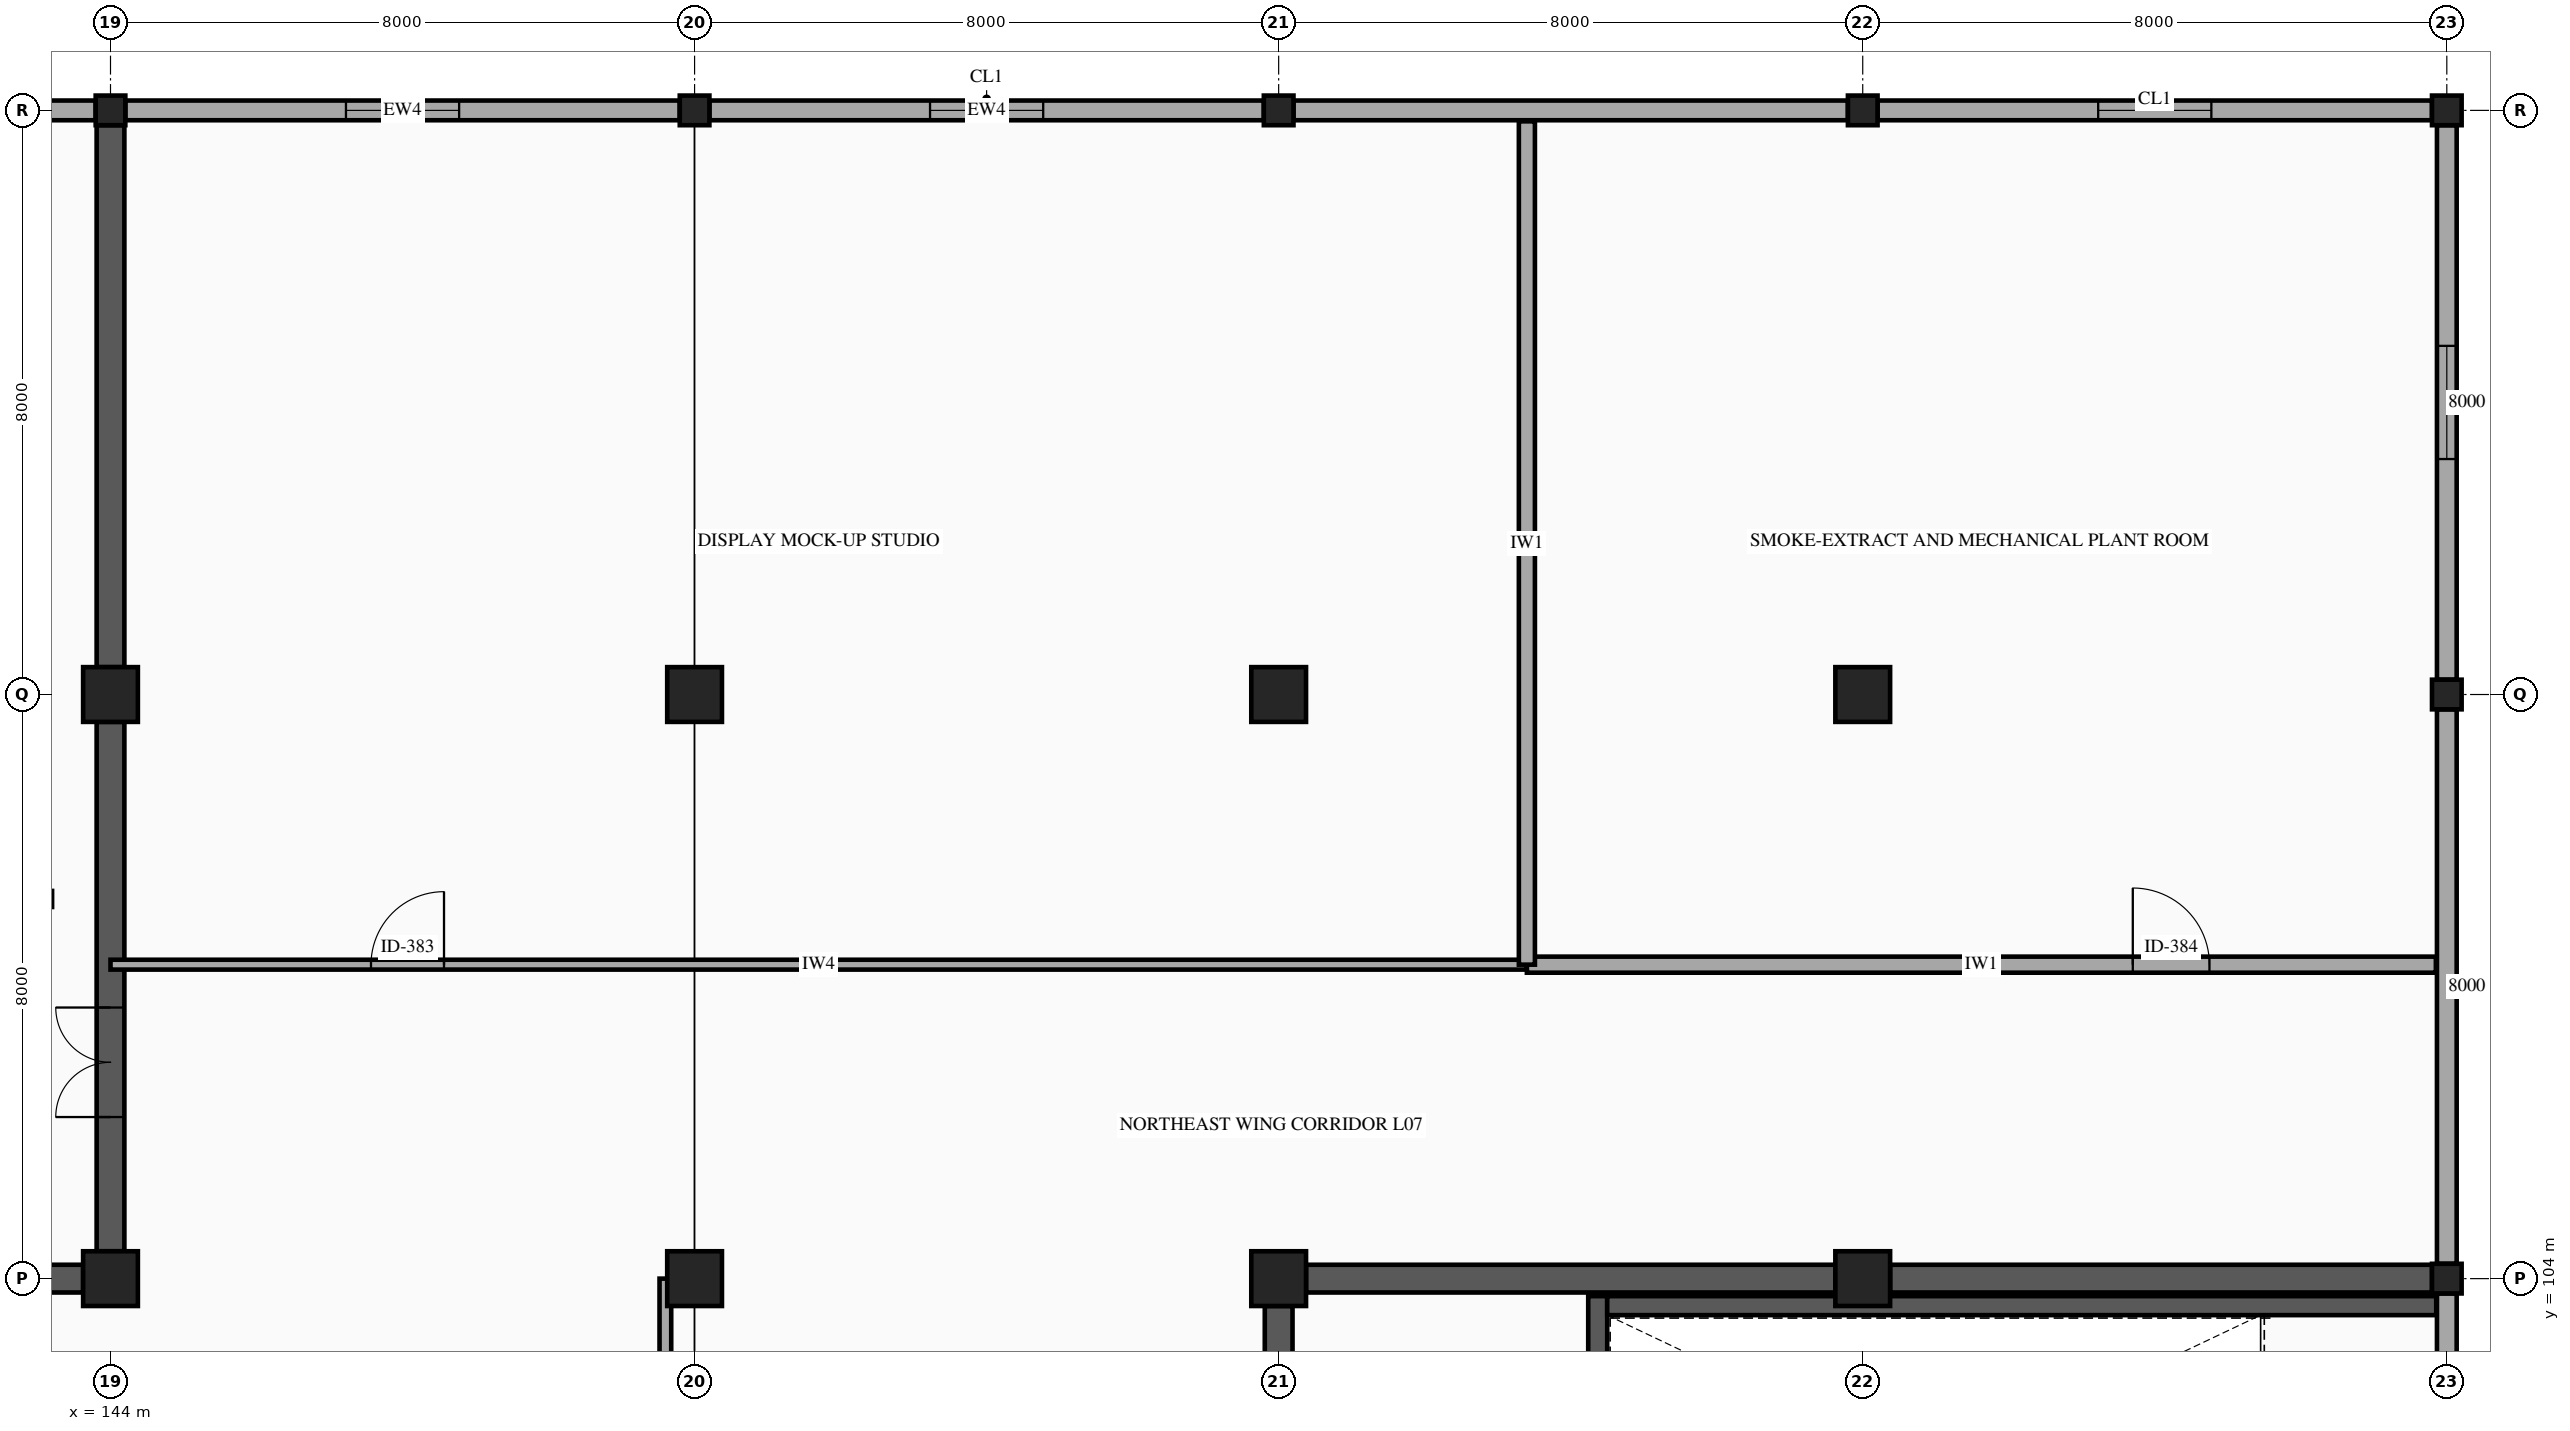
"""IFC4 building model, lengths in metres.
Left out: names, types, materials, properties, quantities, classifications, styles, units other than length and angle.
Written with IfcOpenShell. Run it as: python <this file> out.ifc"""

import sys

from ifc_helpers import new_model, si_unit, direction, frame, frame_2d, origin, origin_2d, place, context, subcontext, project, spatial, rectangle, hollow_rectangle, extrude, element, fill, save


model = new_model("IFC4")
c1 = context("Model", 3, precision=1e-05, world=origin(), true_north=direction((0.0, 1.0)))
c2 = subcontext(c1, "Body", "Model", "MODEL_VIEW")
j1 = project(units=[si_unit("LENGTHUNIT", "METRE"), si_unit("PLANEANGLEUNIT", "RADIAN")], contexts=[c1])
p1 = place(None, origin())
s1 = spatial("IfcSite", under=j1, at=p1, CompositionType="ELEMENT")
p2 = place(p1, origin())
s2 = spatial("IfcBuilding", under=s1, at=p2, CompositionType="ELEMENT")
p3 = place(p2, frame((0.0, 0.0, 32.9)))
s3 = spatial("IfcBuildingStorey", under=s2, at=p3, CompositionType="ELEMENT", Elevation=32.9)
for number, where, z_axis, x_axis in (
    (1, (144.0, 104.0, 0.0), (0.0, 0.0, 1.0), (1.0, 0.0, 0.0)),
    (2, (144.0, 112.0, 0.0), (0.0, 0.0, 1.0), (1.0, 0.0, 0.0)),
):
    element("IfcColumn", number, at=place(p3, frame(where, z_axis=z_axis, x_axis=x_axis)), inside=s3, PredefinedType="COLUMN", context=c2, shape_type="SweptSolid", body=[
        extrude(rectangle(XDim=0.75, YDim=0.75, at=origin_2d()), origin(), (0.0, 0.0, 1.0), 4.6),
    ])
p4 = place(p3, frame((144.0, 120.0, 0.0), z_axis=(0.0, 0.0, 1.0), x_axis=(1.0, 0.0, 0.0)))
e3 = element("IfcColumn", 3, at=p4, inside=s3, PredefinedType="COLUMN", context=c2, shape_type="SweptSolid", body=[
    extrude(hollow_rectangle(XDim=0.406, YDim=0.406, WallThickness=0.015, InnerFilletRadius=0.015, OuterFilletRadius=0.029, at=origin_2d()), origin(), (0.0, 0.0, 1.0), 4.6),
])
for number, where, z_axis, x_axis in (
    (4, (152.0, 104.0, 0.0), (0.0, 0.0, 1.0), (1.0, 0.0, 0.0)),
    (5, (152.0, 112.0, 0.0), (0.0, 0.0, 1.0), (1.0, 0.0, 0.0)),
):
    element("IfcColumn", number, at=place(p3, frame(where, z_axis=z_axis, x_axis=x_axis)), inside=s3, PredefinedType="COLUMN", context=c2, shape_type="SweptSolid", body=[
        extrude(rectangle(XDim=0.75, YDim=0.75, at=origin_2d()), origin(), (0.0, 0.0, 1.0), 4.6),
    ])
p5 = place(p3, frame((152.0, 120.0, 0.0), z_axis=(0.0, 0.0, 1.0), x_axis=(1.0, 0.0, 0.0)))
e6 = element("IfcColumn", 6, at=p5, inside=s3, PredefinedType="COLUMN", context=c2, shape_type="SweptSolid", body=[
    extrude(hollow_rectangle(XDim=0.406, YDim=0.406, WallThickness=0.015, InnerFilletRadius=0.015, OuterFilletRadius=0.029, at=origin_2d()), origin(), (0.0, 0.0, 1.0), 4.6),
])
for number, where, z_axis, x_axis in (
    (7, (160.0, 104.0, 0.0), (0.0, 0.0, 1.0), (1.0, 0.0, 0.0)),
    (8, (160.0, 112.0, 0.0), (0.0, 0.0, 1.0), (1.0, 0.0, 0.0)),
):
    element("IfcColumn", number, at=place(p3, frame(where, z_axis=z_axis, x_axis=x_axis)), inside=s3, PredefinedType="COLUMN", context=c2, shape_type="SweptSolid", body=[
        extrude(rectangle(XDim=0.75, YDim=0.75, at=origin_2d()), origin(), (0.0, 0.0, 1.0), 4.6),
    ])
p6 = place(p3, frame((160.0, 120.0, 0.0), z_axis=(0.0, 0.0, 1.0), x_axis=(1.0, 0.0, 0.0)))
e9 = element("IfcColumn", 9, at=p6, inside=s3, PredefinedType="COLUMN", context=c2, shape_type="SweptSolid", body=[
    extrude(hollow_rectangle(XDim=0.406, YDim=0.406, WallThickness=0.015, InnerFilletRadius=0.015, OuterFilletRadius=0.029, at=origin_2d()), origin(), (0.0, 0.0, 1.0), 4.6),
])
for number, where, z_axis, x_axis in (
    (10, (168.0, 104.0, 0.0), (0.0, 0.0, 1.0), (1.0, 0.0, 0.0)),
    (11, (168.0, 112.0, 0.0), (0.0, 0.0, 1.0), (1.0, 0.0, 0.0)),
):
    element("IfcColumn", number, at=place(p3, frame(where, z_axis=z_axis, x_axis=x_axis)), inside=s3, PredefinedType="COLUMN", context=c2, shape_type="SweptSolid", body=[
        extrude(rectangle(XDim=0.75, YDim=0.75, at=origin_2d()), origin(), (0.0, 0.0, 1.0), 4.6),
    ])
for number, where, z_axis, x_axis in (
    (12, (168.0, 120.0, 0.0), (0.0, 0.0, 1.0), (1.0, 0.0, 0.0)),
    (13, (176.0, 104.0, 0.0), (0.0, 0.0, 1.0), (1.0, 0.0, 0.0)),
    (14, (176.0, 112.0, 0.0), (0.0, 0.0, 1.0), (1.0, 0.0, 0.0)),
    (15, (176.0, 120.0, 0.0), (0.0, 0.0, 1.0), (1.0, 0.0, 0.0)),
):
    element("IfcColumn", number, at=place(p3, frame(where, z_axis=z_axis, x_axis=x_axis)), inside=s3, PredefinedType="COLUMN", context=c2, shape_type="SweptSolid", body=[
        extrude(hollow_rectangle(XDim=0.406, YDim=0.406, WallThickness=0.015, InnerFilletRadius=0.015, OuterFilletRadius=0.029, at=origin_2d()), origin(), (0.0, 0.0, 1.0), 4.6),
    ])
p7 = place(p3, frame((136.203, 120.0, 0.0), z_axis=(0.0, 0.0, 1.0), x_axis=(1.0, 0.0, 0.0)))
e16 = element("IfcWall", 16, at=p7, inside=s3, PredefinedType="STANDARD", context=c2, shape_type="SweptSolid", body=[
    extrude(rectangle(XDim=7.594, YDim=0.27, at=frame_2d((3.797, 0.0))), origin(), (0.0, 0.0, 1.0), 3.58),
])
p8 = place(p3, frame((144.203, 120.0, 0.0), z_axis=(0.0, 0.0, 1.0), x_axis=(1.0, 0.0, 0.0)))
e17 = element("IfcWall", 17, at=p8, inside=s3, PredefinedType="STANDARD", context=c2, shape_type="SweptSolid", body=[
    extrude(rectangle(XDim=7.594, YDim=0.27, at=frame_2d((3.797, 0.0))), origin(), (0.0, 0.0, 1.0), 3.58),
])
p9 = place(p8, frame((3.022, 0.0, 0.8)))
e18 = element("IfcOpeningElement", 18, at=p9, cuts=e17, PredefinedType="OPENING", context=c2, shape_type="SweptSolid", body=[
    extrude(rectangle(XDim=1.55, YDim=1.4, at=frame_2d((0.775, 0.7))), frame((0.0, 0.145, 0.0), z_axis=(0.0, -1.0, 0.0), x_axis=(1.0, 0.0, 0.0)), (0.0, 0.0, 1.0), 0.29),
])
p10 = place(p3, frame((152.203, 120.0, 0.0), z_axis=(0.0, 0.0, 1.0), x_axis=(1.0, 0.0, 0.0)))
e19 = element("IfcWall", 19, at=p10, inside=s3, PredefinedType="STANDARD", context=c2, shape_type="SweptSolid", body=[
    extrude(rectangle(XDim=7.594, YDim=0.27, at=frame_2d((3.797, 0.0))), origin(), (0.0, 0.0, 1.0), 3.58),
])
p11 = place(p10, frame((3.022, 0.0, 0.8)))
e20 = element("IfcOpeningElement", 20, at=p11, cuts=e19, PredefinedType="OPENING", context=c2, shape_type="SweptSolid", body=[
    extrude(rectangle(XDim=1.55, YDim=1.4, at=frame_2d((0.775, 0.7))), frame((0.0, 0.145, 0.0), z_axis=(0.0, -1.0, 0.0), x_axis=(1.0, 0.0, 0.0)), (0.0, 0.0, 1.0), 0.29),
])
p12 = place(p3, frame((160.203, 120.0, 0.0), z_axis=(0.0, 0.0, 1.0), x_axis=(1.0, 0.0, 0.0)))
e21 = element("IfcWall", 21, at=p12, inside=s3, PredefinedType="STANDARD", context=c2, shape_type="SweptSolid", body=[
    extrude(rectangle(XDim=7.594, YDim=0.27, at=frame_2d((3.797, 0.0))), origin(), (0.0, 0.0, 1.0), 3.58),
])
p13 = place(p3, frame((168.203, 120.0, 0.0), z_axis=(0.0, 0.0, 1.0), x_axis=(1.0, 0.0, 0.0)))
e22 = element("IfcWall", 22, at=p13, inside=s3, PredefinedType="STANDARD", context=c2, shape_type="SweptSolid", body=[
    extrude(rectangle(XDim=7.594, YDim=0.27, at=frame_2d((3.797, 0.0))), origin(), (0.0, 0.0, 1.0), 3.58),
])
p14 = place(p13, frame((3.022, 0.0, 0.8)))
e23 = element("IfcOpeningElement", 23, at=p14, cuts=e22, PredefinedType="OPENING", context=c2, shape_type="SweptSolid", body=[
    extrude(rectangle(XDim=1.55, YDim=1.4, at=frame_2d((0.775, 0.7))), frame((0.0, 0.145, 0.0), z_axis=(0.0, -1.0, 0.0), x_axis=(1.0, 0.0, 0.0)), (0.0, 0.0, 1.0), 0.29),
])
p15 = place(p3, frame((176.0, 119.797, 0.0), z_axis=(0.0, 0.0, 1.0), x_axis=(0.0, -1.0, 0.0)))
e24 = element("IfcWall", 24, at=p15, inside=s3, PredefinedType="STANDARD", context=c2, shape_type="SweptSolid", body=[
    extrude(rectangle(XDim=7.594, YDim=0.27, at=frame_2d((3.797, 0.0))), origin(), (0.0, 0.0, 1.0), 3.58),
])
p16 = place(p15, frame((3.022, 0.0, 0.8)))
e25 = element("IfcOpeningElement", 25, at=p16, cuts=e24, PredefinedType="OPENING", context=c2, shape_type="SweptSolid", body=[
    extrude(rectangle(XDim=1.55, YDim=1.4, at=frame_2d((0.775, 0.7))), frame((0.0, 0.145, 0.0), z_axis=(0.0, -1.0, 0.0), x_axis=(1.0, 0.0, 0.0)), (0.0, 0.0, 1.0), 0.29),
])
for number, where, z_axis, x_axis in (
    (26, (176.0, 111.797, 0.0), (0.0, 0.0, 1.0), (0.0, -1.0, 0.0)),
    (27, (176.0, 103.797, 0.0), (0.0, 0.0, 1.0), (0.0, -1.0, 0.0)),
):
    element("IfcWall", number, at=place(p3, frame(where, z_axis=z_axis, x_axis=x_axis)), inside=s3, PredefinedType="STANDARD", context=c2, shape_type="SweptSolid", body=[
        extrude(rectangle(XDim=7.594, YDim=0.27, at=frame_2d((3.797, 0.0))), origin(), (0.0, 0.0, 1.0), 3.58),
    ])
p17 = place(p3, frame((136.375, 104.0, 0.0), z_axis=(0.0, 0.0, 1.0), x_axis=(1.0, 0.0, 0.0)))
e28 = element("IfcWall", 28, at=p17, inside=s3, PredefinedType="SHEAR", context=c2, shape_type="SweptSolid", body=[
    extrude(rectangle(XDim=7.25, YDim=0.38, at=frame_2d((3.625, 0.0))), origin(), (0.0, 0.0, 1.0), 4.38),
])
p18 = place(p17, frame((2.875, 0.0, 0.0)))
e29 = element("IfcOpeningElement", 29, at=p18, cuts=e28, PredefinedType="OPENING", context=c2, shape_type="SweptSolid", body=[
    extrude(rectangle(XDim=1.5, YDim=2.15, at=frame_2d((0.75, 1.075))), frame((0.0, 0.2, 0.0), z_axis=(0.0, -1.0, 0.0), x_axis=(1.0, 0.0, 0.0)), (0.0, 0.0, 1.0), 0.4),
])
p19 = place(p3, frame((144.0, 104.375, 0.0), z_axis=(0.0, 0.0, 1.0), x_axis=(0.0, 1.0, 0.0)))
e30 = element("IfcWall", 30, at=p19, inside=s3, PredefinedType="SHEAR", context=c2, shape_type="SweptSolid", body=[
    extrude(rectangle(XDim=7.25, YDim=0.38, at=frame_2d((3.625, 0.0))), origin(), (0.0, 0.0, 1.0), 4.38),
])
p20 = place(p19, frame((1.838, 0.0, 0.0)))
e31 = element("IfcOpeningElement", 31, at=p20, cuts=e30, PredefinedType="OPENING", context=c2, shape_type="SweptSolid", body=[
    extrude(rectangle(XDim=1.5, YDim=2.15, at=frame_2d((0.75, 1.075))), frame((0.0, 0.2, 0.0), z_axis=(0.0, -1.0, 0.0), x_axis=(1.0, 0.0, 0.0)), (0.0, 0.0, 1.0), 0.4),
])
p21 = place(p3, frame((144.0, 112.375, 0.0), z_axis=(0.0, 0.0, 1.0), x_axis=(0.0, 1.0, 0.0)))
e32 = element("IfcWall", 32, at=p21, inside=s3, PredefinedType="SHEAR", context=c2, shape_type="SweptSolid", body=[
    extrude(rectangle(XDim=7.422, YDim=0.38, at=frame_2d((3.711, 0.0))), origin(), (0.0, 0.0, 1.0), 4.38),
])
p22 = place(p3, frame((164.37, 98.99, 0.0), z_axis=(0.0, 0.0, 1.0), x_axis=(0.0, 1.0, 0.0)))
e33 = element("IfcWall", 33, at=p22, inside=s3, PredefinedType="SHEAR", context=c2, shape_type="SweptSolid", body=[
    extrude(rectangle(XDim=4.77, YDim=0.26, at=frame_2d((2.385, 0.0))), origin(), (0.0, 0.0, 1.0), 4.38),
])
p23 = place(p3, frame((164.5, 103.63, 0.0), z_axis=(0.0, 0.0, 1.0), x_axis=(1.0, 0.0, 0.0)))
e34 = element("IfcWall", 34, at=p23, inside=s3, PredefinedType="SHEAR", context=c2, shape_type="SweptSolid", body=[
    extrude(rectangle(XDim=11.355, YDim=0.26, at=frame_2d((5.677, 0.0))), origin(), (0.0, 0.0, 1.0), 4.38),
])
p24 = place(p3, frame((160.375, 104.0, 0.0), z_axis=(0.0, 0.0, 1.0), x_axis=(1.0, 0.0, 0.0)))
e35 = element("IfcWall", 35, at=p24, inside=s3, PredefinedType="SHEAR", context=c2, shape_type="SweptSolid", body=[
    extrude(rectangle(XDim=7.25, YDim=0.38, at=frame_2d((3.625, 0.0))), origin(), (0.0, 0.0, 1.0), 4.38),
])
p25 = place(p3, frame((168.375, 104.0, 0.0), z_axis=(0.0, 0.0, 1.0), x_axis=(1.0, 0.0, 0.0)))
e36 = element("IfcWall", 36, at=p25, inside=s3, PredefinedType="SHEAR", context=c2, shape_type="SweptSolid", body=[
    extrude(rectangle(XDim=7.422, YDim=0.38, at=frame_2d((3.711, 0.0))), origin(), (0.0, 0.0, 1.0), 4.38),
])
p26 = place(p3, frame((160.0, 96.375, 0.0), z_axis=(0.0, 0.0, 1.0), x_axis=(0.0, 1.0, 0.0)))
e37 = element("IfcWall", 37, at=p26, inside=s3, PredefinedType="SHEAR", context=c2, shape_type="SweptSolid", body=[
    extrude(rectangle(XDim=7.25, YDim=0.38, at=frame_2d((3.625, 0.0))), origin(), (0.0, 0.0, 1.0), 4.38),
])
p27 = place(p3, frame((151.6, 88.15, 0.0), z_axis=(0.0, 0.0, 1.0), x_axis=(0.0, 1.0, 0.0)))
e38 = element("IfcWall", 38, at=p27, inside=s3, PredefinedType="PARTITIONING", context=c2, shape_type="SweptSolid", body=[
    extrude(rectangle(XDim=15.85, YDim=0.16, at=frame_2d((7.925, 0.0))), origin(), (0.0, 0.0, 1.0), 3.58),
])
p28 = place(p27, frame((11.356, 0.0, 0.0)))
e39 = element("IfcOpeningElement", 39, at=p28, cuts=e38, PredefinedType="OPENING", context=c2, shape_type="SweptSolid", body=[
    extrude(rectangle(XDim=1.0, YDim=2.15, at=frame_2d((0.5, 1.075))), frame((0.0, 0.09, 0.0), z_axis=(0.0, -1.0, 0.0), x_axis=(1.0, 0.0, 0.0)), (0.0, 0.0, 1.0), 0.18),
])
p29 = place(p3, frame((144.0, 108.3, 0.0), z_axis=(0.0, 0.0, 1.0), x_axis=(1.0, 0.0, 0.0)))
e40 = element("IfcWall", 40, at=p29, inside=s3, PredefinedType="PARTITIONING", context=c2, shape_type="SweptSolid", body=[
    extrude(rectangle(XDim=19.4, YDim=0.135, at=frame_2d((9.7, 0.0))), origin(), (0.0, 0.0, 1.0), 3.58),
])
p30 = place(p29, frame((3.568, 0.0, 0.0)))
e41 = element("IfcOpeningElement", 41, at=p30, cuts=e40, PredefinedType="OPENING", context=c2, shape_type="SweptSolid", body=[
    extrude(rectangle(XDim=1.0, YDim=2.15, at=frame_2d((0.5, 1.075))), frame((0.0, 0.077, 0.0), z_axis=(0.0, -1.0, 0.0), x_axis=(1.0, 0.0, 0.0)), (0.0, 0.0, 1.0), 0.155),
])
p31 = place(p3, frame((163.4, 108.3, 0.0), z_axis=(0.0, 0.0, 1.0), x_axis=(1.0, 0.0, 0.0)))
e42 = element("IfcWall", 42, at=p31, inside=s3, PredefinedType="PARTITIONING", context=c2, shape_type="SweptSolid", body=[
    extrude(rectangle(XDim=12.45, YDim=0.22, at=frame_2d((6.225, 0.0))), origin(), (0.0, 0.0, 1.0), 3.58),
])
p32 = place(p31, frame((8.299, 0.0, 0.0)))
e43 = element("IfcOpeningElement", 43, at=p32, cuts=e42, PredefinedType="OPENING", context=c2, shape_type="SweptSolid", body=[
    extrude(rectangle(XDim=1.05, YDim=2.15, at=frame_2d((0.525, 1.075))), frame((0.0, 0.12, 0.0), z_axis=(0.0, -1.0, 0.0), x_axis=(1.0, 0.0, 0.0)), (0.0, 0.0, 1.0), 0.24),
])
p33 = place(p3, frame((163.4, 108.3, 0.0), z_axis=(0.0, 0.0, 1.0), x_axis=(0.0, 1.0, 0.0)))
e44 = element("IfcWall", 44, at=p33, inside=s3, PredefinedType="PARTITIONING", context=c2, shape_type="SweptSolid", body=[
    extrude(rectangle(XDim=11.55, YDim=0.22, at=frame_2d((5.775, 0.0))), origin(), (0.0, 0.0, 1.0), 3.58),
])
p34 = place(p9, origin())
e45 = element("IfcWindow", 45, at=p34, inside=s3, PartitioningType="SINGLE_PANEL", PredefinedType="WINDOW", context=c2, shape_type="SweptSolid", body=[
    extrude(rectangle(XDim=1.55, YDim=1.4, at=frame_2d((0.775, 0.7))), frame((0.0, 0.03, 0.0), z_axis=(0.0, -1.0, 0.0), x_axis=(1.0, 0.0, 0.0)), (0.0, 0.0, 1.0), 0.06),
])
fill(e18, e45)
p35 = place(p11, origin())
e46 = element("IfcWindow", 46, at=p35, inside=s3, PartitioningType="SINGLE_PANEL", PredefinedType="WINDOW", context=c2, shape_type="SweptSolid", body=[
    extrude(rectangle(XDim=1.55, YDim=1.4, at=frame_2d((0.775, 0.7))), frame((0.0, 0.03, 0.0), z_axis=(0.0, -1.0, 0.0), x_axis=(1.0, 0.0, 0.0)), (0.0, 0.0, 1.0), 0.06),
])
fill(e20, e46)
p36 = place(p14, origin())
e47 = element("IfcWindow", 47, at=p36, inside=s3, PartitioningType="SINGLE_PANEL", PredefinedType="WINDOW", context=c2, shape_type="SweptSolid", body=[
    extrude(rectangle(XDim=1.55, YDim=1.4, at=frame_2d((0.775, 0.7))), frame((0.0, 0.03, 0.0), z_axis=(0.0, -1.0, 0.0), x_axis=(1.0, 0.0, 0.0)), (0.0, 0.0, 1.0), 0.06),
])
fill(e23, e47)
p37 = place(p16, origin())
e48 = element("IfcWindow", 48, at=p37, inside=s3, PartitioningType="SINGLE_PANEL", PredefinedType="WINDOW", context=c2, shape_type="SweptSolid", body=[
    extrude(rectangle(XDim=1.55, YDim=1.4, at=frame_2d((0.775, 0.7))), frame((0.0, 0.03, 0.0), z_axis=(0.0, -1.0, 0.0), x_axis=(1.0, 0.0, 0.0)), (0.0, 0.0, 1.0), 0.06),
])
fill(e25, e48)
p38 = place(p20, origin())
e49 = element("IfcDoor", 49, at=p38, inside=s3, OperationType="DOUBLE_DOOR_SINGLE_SWING", PredefinedType="DOOR", context=c2, shape_type="SweptSolid", body=[
    extrude(rectangle(XDim=1.5, YDim=2.15, at=frame_2d((0.75, 1.075))), frame((0.0, 0.025, 0.0), z_axis=(0.0, -1.0, 0.0), x_axis=(1.0, 0.0, 0.0)), (0.0, 0.0, 1.0), 0.05),
])
fill(e31, e49)
p39 = place(p30, origin())
e50 = element("IfcDoor", 50, at=p39, inside=s3, OperationType="SINGLE_SWING_RIGHT", PredefinedType="DOOR", context=c2, shape_type="SweptSolid", body=[
    extrude(rectangle(XDim=1.0, YDim=2.15, at=frame_2d((0.5, 1.075))), frame((0.0, 0.025, 0.0), z_axis=(0.0, -1.0, 0.0), x_axis=(1.0, 0.0, 0.0)), (0.0, 0.0, 1.0), 0.05),
])
fill(e41, e50)
p40 = place(p32, origin())
e51 = element("IfcDoor", 51, at=p40, inside=s3, OperationType="SINGLE_SWING_LEFT", PredefinedType="DOOR", context=c2, shape_type="SweptSolid", body=[
    extrude(rectangle(XDim=1.05, YDim=2.15, at=frame_2d((0.525, 1.075))), frame((0.0, 0.025, 0.0), z_axis=(0.0, -1.0, 0.0), x_axis=(1.0, 0.0, 0.0)), (0.0, 0.0, 1.0), 0.05),
])
fill(e43, e51)
save(model, sys.argv[1])
